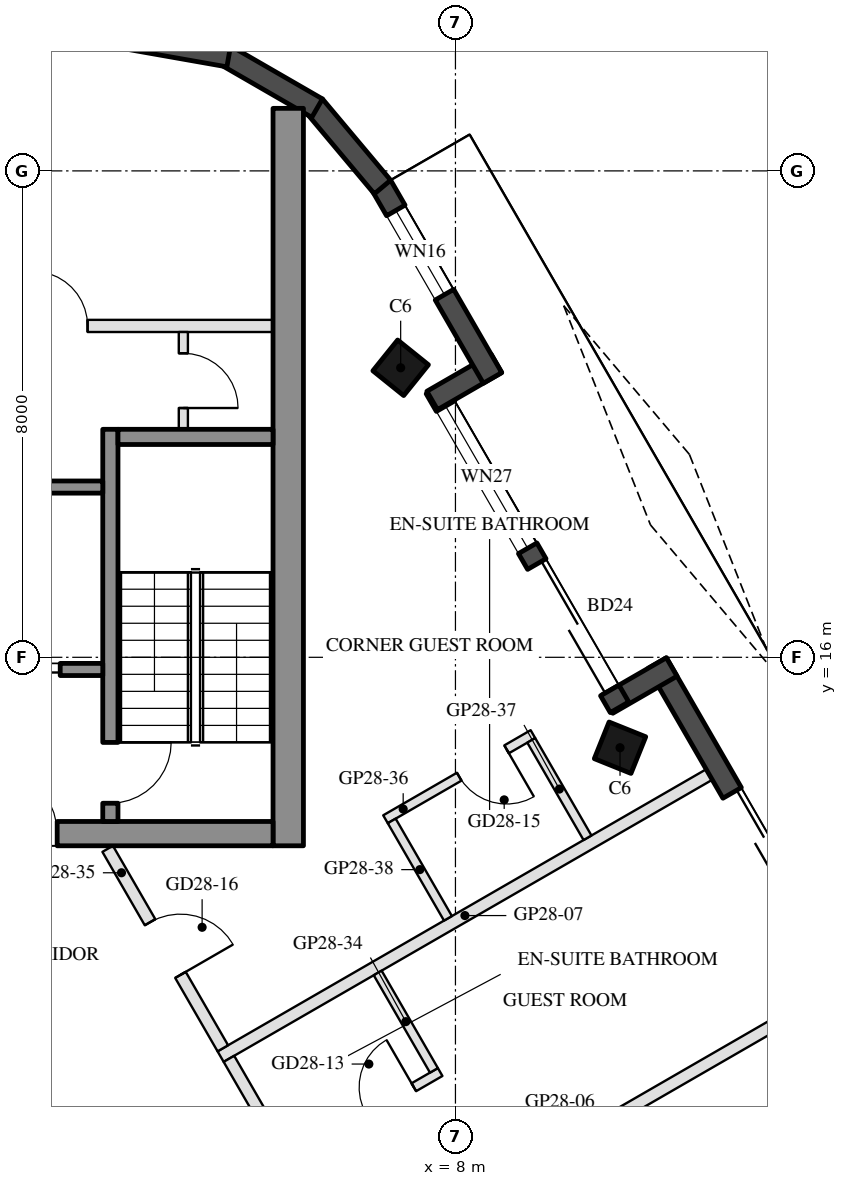
"""IFC4 building model, lengths in metres.
Left out: names, types, materials, properties, quantities, classifications, styles, units other than length and angle.
Written with IfcOpenShell. Run it as: python <this file> out.ifc"""

import sys

from ifc_helpers import new_model, si_unit, direction, frame, frame_2d, origin, origin_2d, place, context, subcontext, project, spatial, rectangle, hollow_rectangle, extrude, boolean, halfspace, element, fill, save


model = new_model("IFC4")
c1 = context("Model", 3, precision=1e-05, world=origin(), true_north=direction((0.0, 1.0)))
c2 = subcontext(c1, "Body", "Model", "MODEL_VIEW")
j1 = project(units=[si_unit("LENGTHUNIT", "METRE"), si_unit("PLANEANGLEUNIT", "RADIAN")], contexts=[c1])
p1 = place(None, origin())
s1 = spatial("IfcSite", under=j1, at=p1, CompositionType="ELEMENT")
p2 = place(p1, origin())
s2 = spatial("IfcBuilding", under=s1, at=p2, CompositionType="ELEMENT")
p3 = place(p2, frame((0.0, 0.0, 287.4)))
s3 = spatial("IfcBuildingStorey", under=s2, at=p3, CompositionType="ELEMENT", Elevation=287.4)
p4 = place(p3, frame((10.707, 14.513, 0.0), z_axis=(-0.100511564979, -0.128308480942, 0.986627771261), x_axis=(-0.503128985572, 0.862066140583, 0.060853867073)))
e1 = element("IfcColumn", 1, at=p4, inside=s3, PredefinedType="COLUMN", context=c2, shape_type="SweptSolid", body=[
    boolean("DIFFERENCE", boolean("DIFFERENCE", extrude(hollow_rectangle(XDim=0.65, YDim=0.65, WallThickness=0.03, at=origin_2d()), origin(), (0.0, 0.0, 1.0), 3.75), halfspace(frame((0.0, 0.0, 0.04), z_axis=(0.0, 0.0, 1.0), x_axis=(1.0, 0.0, 0.0)), True)), halfspace(frame((0.0, 0.0, 3.711), z_axis=(0.0, 0.0, 1.0), x_axis=(1.0, 0.0, 0.0)), False)),
])
p5 = place(p3, frame((7.099, 20.762, 0.0), z_axis=(-0.069724781061, -0.17997668649, 0.981196640448), x_axis=(-0.504170276758, 0.855083108193, 0.121017395929)))
e2 = element("IfcColumn", 2, at=p5, inside=s3, PredefinedType="COLUMN", context=c2, shape_type="SweptSolid", body=[
    boolean("DIFFERENCE", boolean("DIFFERENCE", extrude(hollow_rectangle(XDim=0.65, YDim=0.65, WallThickness=0.03, at=origin_2d()), origin(), (0.0, 0.0, 1.0), 3.771), halfspace(frame((0.0, 0.0, 0.047), z_axis=(0.0, 0.0, 1.0), x_axis=(1.0, 0.0, 0.0)), True)), halfspace(frame((0.0, 0.0, 3.724), z_axis=(0.0, 0.0, 1.0), x_axis=(1.0, 0.0, 0.0)), False)),
])
p6 = place(p3, frame((15.825, 8.097, 0.0), z_axis=(0.0, 0.0, 1.0), x_axis=(-0.500006872736, 0.866021435772, 0.0)))
e3 = element("IfcWall", 3, at=p6, inside=s3, PredefinedType="SOLIDWALL", context=c2, shape_type="SweptSolid", body=[
    extrude(rectangle(XDim=9.015, YDim=0.35, at=frame_2d((4.508, 0.0))), origin(), (0.0, 0.0, 1.0), 3.55),
])
p7 = place(p6, frame((1.579, 0.0, 0.3)))
e4 = element("IfcOpeningElement", 4, at=p7, cuts=e3, PredefinedType="OPENING", context=c2, shape_type="SweptSolid", body=[
    extrude(rectangle(XDim=0.8, YDim=2.65, at=frame_2d((0.4, 1.325))), frame((0.0, 0.185, 0.0), z_axis=(0.0, -1.0, 0.0), x_axis=(1.0, 0.0, 0.0)), (0.0, 0.0, 1.0), 0.37),
])
p8 = place(p6, frame((4.75, 0.0, 0.0)))
e5 = element("IfcOpeningElement", 5, at=p8, cuts=e3, PredefinedType="OPENING", context=c2, shape_type="SweptSolid", body=[
    extrude(rectangle(XDim=1.8, YDim=2.4, at=frame_2d((0.9, 1.2))), frame((0.0, 0.185, 0.0), z_axis=(0.0, -1.0, 0.0), x_axis=(1.0, 0.0, 0.0)), (0.0, 0.0, 1.0), 0.37),
])
p9 = place(p6, frame((3.35, 0.0, 0.3)))
e6 = element("IfcOpeningElement", 6, at=p9, cuts=e3, PredefinedType="OPENING", context=c2, shape_type="SweptSolid", body=[
    extrude(rectangle(XDim=1.0, YDim=2.65, at=frame_2d((0.5, 1.325))), frame((0.0, 0.185, 0.0), z_axis=(0.0, -1.0, 0.0), x_axis=(1.0, 0.0, 0.0)), (0.0, 0.0, 1.0), 0.37),
])
p10 = place(p3, frame((11.557, 15.841, 0.0), z_axis=(0.0, 0.0, 1.0), x_axis=(-0.866005645448, -0.500034220881, 0.0)))
e7 = element("IfcWall", 7, at=p10, inside=s3, PredefinedType="SOLIDWALL", context=c2, shape_type="SweptSolid", body=[
    extrude(rectangle(XDim=1.22, YDim=0.35, at=frame_2d((0.61, 0.0))), origin(), (0.0, 0.0, 1.0), 3.55),
])
p11 = place(p3, frame((10.698, 15.178, 0.0), z_axis=(0.0, 0.0, 1.0), x_axis=(-0.499985371027, 0.866033849661, 0.0)))
e8 = element("IfcWall", 8, at=p11, inside=s3, PredefinedType="SOLIDWALL", context=c2, shape_type="SweptSolid", body=[
    extrude(rectangle(XDim=6.055, YDim=0.35, at=frame_2d((3.028, 0.0))), origin(), (0.0, 0.0, 1.0), 3.55),
])
p12 = place(p11, frame((0.32, 0.0, 0.0)))
e9 = element("IfcOpeningElement", 9, at=p12, cuts=e8, PredefinedType="OPENING", context=c2, shape_type="SweptSolid", body=[
    extrude(rectangle(XDim=2.4, YDim=2.4, at=frame_2d((1.2, 1.2))), frame((0.0, 0.185, 0.0), z_axis=(0.0, -1.0, 0.0), x_axis=(1.0, 0.0, 0.0)), (0.0, 0.0, 1.0), 0.37),
])
p13 = place(p11, frame((3.02, 0.0, 0.3)))
e10 = element("IfcOpeningElement", 10, at=p13, cuts=e8, PredefinedType="OPENING", context=c2, shape_type="SweptSolid", body=[
    extrude(rectangle(XDim=2.7, YDim=2.65, at=frame_2d((1.35, 1.325))), frame((0.0, 0.185, 0.0), z_axis=(0.0, -1.0, 0.0), x_axis=(1.0, 0.0, 0.0)), (0.0, 0.0, 1.0), 0.37),
])
p14 = place(p3, frame((7.617, 20.224, 0.0), z_axis=(0.0, 0.0, 1.0), x_axis=(0.866005645448, 0.500034220881, 0.0)))
e11 = element("IfcWall", 11, at=p14, inside=s3, PredefinedType="SOLIDWALL", context=c2, shape_type="SweptSolid", body=[
    extrude(rectangle(XDim=1.22, YDim=0.35, at=frame_2d((0.61, 0.0))), origin(), (0.0, 0.0, 1.0), 3.55),
])
p15 = place(p3, frame((8.61, 20.595, 0.0), z_axis=(0.0, 0.0, 1.0), x_axis=(-0.499990402704, 0.866030944715, 0.0)))
e12 = element("IfcWall", 12, at=p15, inside=s3, PredefinedType="SOLIDWALL", context=c2, shape_type="SweptSolid", body=[
    extrude(rectangle(XDim=3.654, YDim=0.35, at=frame_2d((1.827, 0.0))), origin(), (0.0, 0.0, 1.0), 3.55),
])
p16 = place(p15, frame((1.581, 0.0, 0.3)))
e13 = element("IfcOpeningElement", 13, at=p16, cuts=e12, PredefinedType="OPENING", context=c2, shape_type="SweptSolid", body=[
    extrude(rectangle(XDim=1.6, YDim=2.65, at=frame_2d((0.8, 1.325))), frame((0.0, 0.185, 0.0), z_axis=(0.0, -1.0, 0.0), x_axis=(1.0, 0.0, 0.0)), (0.0, 0.0, 1.0), 0.37),
])
for number, where, z_axis, x_axis in (
    (14, (6.8, 23.735, 0.0), (0.0, 0.0, 1.0), (-0.643, 0.766, 0.0)),
    (15, (5.725, 25.032, 0.0), (0.0, 0.0, 1.0), (-0.866, 0.5, 0.0)),
    (16, (4.271, 25.884, 0.0), (0.0, 0.0, 1.0), (-0.985, 0.174, 0.0)),
):
    element("IfcWall", number, at=place(p3, frame(where, z_axis=z_axis, x_axis=x_axis)), inside=s3, PredefinedType="SOLIDWALL", context=c2, shape_type="SweptSolid", body=[
        extrude(rectangle(XDim=1.745, YDim=0.35, at=frame_2d((0.872, 0.0))), origin(), (0.0, 0.0, 1.0), 3.55),
    ])
p17 = place(p3, frame((5.25, 12.9, 0.0), z_axis=(0.0, 0.0, 1.0), x_axis=(0.0, 1.0, 0.0)))
e17 = element("IfcWall", 17, at=p17, inside=s3, PredefinedType="SHEAR", context=c2, shape_type="SweptSolid", body=[
    extrude(rectangle(XDim=12.129, YDim=0.5, at=frame_2d((6.064, 0.0))), origin(), (0.0, 0.0, 1.0), 3.5),
])
p18 = place(p3, frame((5.0, 13.1, 0.0), z_axis=(0.0, 0.0, 1.0), x_axis=(-1.0, 0.0, 0.0)))
e18 = element("IfcWall", 18, at=p18, inside=s3, PredefinedType="SHEAR", context=c2, shape_type="SweptSolid", body=[
    extrude(rectangle(XDim=10.0, YDim=0.4, at=frame_2d((5.0, 0.0))), origin(), (0.0, 0.0, 1.0), 3.5),
])
p19 = place(p18, frame((3.55, 0.0, 0.0)))
e19 = element("IfcOpeningElement", 19, at=p19, cuts=e18, PredefinedType="OPENING", context=c2, shape_type="SweptSolid", body=[
    extrude(rectangle(XDim=1.1, YDim=2.1, at=frame_2d((0.55, 1.05))), frame((0.0, 0.21, 0.0), z_axis=(0.0, -1.0, 0.0), x_axis=(1.0, 0.0, 0.0)), (0.0, 0.0, 1.0), 0.42),
])
p20 = place(p18, frame((5.85, 0.0, 0.0)))
e20 = element("IfcOpeningElement", 20, at=p20, cuts=e18, PredefinedType="OPENING", context=c2, shape_type="SweptSolid", body=[
    extrude(rectangle(XDim=1.4, YDim=2.1, at=frame_2d((0.7, 1.05))), frame((0.0, 0.21, 0.0), z_axis=(0.0, -1.0, 0.0), x_axis=(1.0, 0.0, 0.0)), (0.0, 0.0, 1.0), 0.42),
])
p21 = place(p3, frame((2.325, 13.3, 0.0), z_axis=(0.0, 0.0, 1.0), x_axis=(0.0, 1.0, 0.0)))
e21 = element("IfcWall", 21, at=p21, inside=s3, PredefinedType="SHEAR", context=c2, shape_type="SweptSolid", body=[
    extrude(rectangle(XDim=6.45, YDim=0.25, at=frame_2d((3.225, 0.0))), origin(), (0.0, 0.0, 1.0), 3.5),
])
p22 = place(p21, frame((0.3, 0.0, 0.0)))
e22 = element("IfcOpeningElement", 22, at=p22, cuts=e21, PredefinedType="OPENING", context=c2, shape_type="SweptSolid", body=[
    extrude(rectangle(XDim=1.0, YDim=2.1, at=frame_2d((0.5, 1.05))), frame((0.0, 0.135, 0.0), z_axis=(0.0, -1.0, 0.0), x_axis=(1.0, 0.0, 0.0)), (0.0, 0.0, 1.0), 0.27),
])
p23 = place(p3, frame((5.0, 19.625, 0.0), z_axis=(0.0, 0.0, 1.0), x_axis=(-1.0, 0.0, 0.0)))
e23 = element("IfcWall", 23, at=p23, inside=s3, PredefinedType="SHEAR", context=c2, shape_type="SweptSolid", body=[
    extrude(rectangle(XDim=2.55, YDim=0.25, at=frame_2d((1.275, 0.0))), origin(), (0.0, 0.0, 1.0), 3.5),
])
p24 = place(p3, frame((2.2, 18.8, 0.0), z_axis=(0.0, 0.0, 1.0), x_axis=(-1.0, 0.0, 0.0)))
e24 = element("IfcWall", 24, at=p24, inside=s3, PredefinedType="SHEAR", context=c2, shape_type="SweptSolid", body=[
    extrude(rectangle(XDim=2.8, YDim=0.2, at=frame_2d((1.4, 0.0))), origin(), (0.0, 0.0, 1.0), 3.5),
])
p25 = place(p3, frame((2.2, 15.8, 0.0), z_axis=(0.0, 0.0, 1.0), x_axis=(-1.0, 0.0, 0.0)))
e25 = element("IfcWall", 25, at=p25, inside=s3, PredefinedType="SHEAR", context=c2, shape_type="SweptSolid", body=[
    extrude(rectangle(XDim=2.8, YDim=0.2, at=frame_2d((1.4, 0.0))), origin(), (0.0, 0.0, 1.0), 3.5),
])
p26 = place(p25, frame((0.7, 0.0, 0.0)))
e26 = element("IfcOpeningElement", 26, at=p26, cuts=e25, PredefinedType="OPENING", context=c2, shape_type="SweptSolid", body=[
    extrude(rectangle(XDim=1.2, YDim=2.1, at=frame_2d((0.6, 1.05))), frame((0.0, 0.11, 0.0), z_axis=(0.0, -1.0, 0.0), x_axis=(1.0, 0.0, 0.0)), (0.0, 0.0, 1.0), 0.22),
])
p27 = place(p3, frame((5.0, 21.45, 0.0), z_axis=(0.0, 0.0, 1.0), x_axis=(-1.0, 0.0, 0.0)))
e27 = element("IfcWall", 27, at=p27, inside=s3, PredefinedType="PARTITIONING", context=c2, shape_type="SweptSolid", body=[
    extrude(rectangle(XDim=5.4, YDim=0.2, at=frame_2d((2.7, 0.0))), origin(), (0.0, 0.0, 1.0), 3.5),
])
p28 = place(p27, frame((3.05, 0.0, 0.0)))
e28 = element("IfcOpeningElement", 28, at=p28, cuts=e27, PredefinedType="OPENING", context=c2, shape_type="SweptSolid", body=[
    extrude(rectangle(XDim=0.9, YDim=2.1, at=frame_2d((0.45, 1.05))), frame((0.0, 0.11, 0.0), z_axis=(0.0, -1.0, 0.0), x_axis=(1.0, 0.0, 0.0)), (0.0, 0.0, 1.0), 0.22),
])
p29 = place(p3, frame((3.525, 19.75, 0.0), z_axis=(0.0, 0.0, 1.0), x_axis=(0.0, 1.0, 0.0)))
e29 = element("IfcWall", 29, at=p29, inside=s3, PredefinedType="PARTITIONING", context=c2, shape_type="SweptSolid", body=[
    extrude(rectangle(XDim=1.6, YDim=0.15, at=frame_2d((0.8, 0.0))), origin(), (0.0, 0.0, 1.0), 3.5),
])
p30 = place(p29, frame((0.35, 0.0, 0.0)))
e30 = element("IfcOpeningElement", 30, at=p30, cuts=e29, PredefinedType="OPENING", context=c2, shape_type="SweptSolid", body=[
    extrude(rectangle(XDim=0.9, YDim=2.1, at=frame_2d((0.45, 1.05))), frame((0.0, 0.085, 0.0), z_axis=(0.0, -1.0, 0.0), x_axis=(1.0, 0.0, 0.0)), (0.0, 0.0, 1.0), 0.17),
])
p31 = place(p3, frame((14.224, 10.521, 0.0), z_axis=(0.0, 0.0, 1.0), x_axis=(-0.866024341471, -0.500001839976, 0.0)))
e31 = element("IfcWall", 31, at=p31, inside=s3, PredefinedType="PARTITIONING", context=c2, shape_type="SweptSolid", body=[
    extrude(rectangle(XDim=9.279, YDim=0.2, at=frame_2d((4.639, 0.0))), origin(), (0.0, 0.0, 1.0), 3.1),
])
p32 = place(p3, frame((12.174, 14.072, 0.0), z_axis=(0.0, 0.0, 1.0), x_axis=(-0.866035734738, -0.499982105836, 0.0)))
e32 = element("IfcWall", 32, at=p32, inside=s3, PredefinedType="PARTITIONING", context=c2, shape_type="SweptSolid", body=[
    extrude(rectangle(XDim=9.279, YDim=0.2, at=frame_2d((4.639, 0.0))), origin(), (0.0, 0.0, 1.0), 3.1),
])
p33 = place(p3, frame((4.275, 9.396, 0.0), z_axis=(0.0, 0.0, 1.0), x_axis=(0.499997012787, -0.866027128446, 0.0)))
e33 = element("IfcWall", 33, at=p33, inside=s3, PredefinedType="PARTITIONING", context=c2, shape_type="SweptSolid", body=[
    extrude(rectangle(XDim=3.9, YDim=0.2, at=frame_2d((1.95, 0.0))), origin(), (0.0, 0.0, 1.0), 3.05),
])
p34 = place(p33, frame((2.45, 0.0, 0.0)))
e34 = element("IfcOpeningElement", 34, at=p34, cuts=e33, PredefinedType="OPENING", context=c2, shape_type="SweptSolid", body=[
    extrude(rectangle(XDim=1.0, YDim=2.1, at=frame_2d((0.5, 1.05))), frame((0.0, 0.11, 0.0), z_axis=(0.0, -1.0, 0.0), x_axis=(1.0, 0.0, 0.0)), (0.0, 0.0, 1.0), 0.22),
])
p35 = place(p3, frame((5.324, 7.779, 0.0), z_axis=(0.0, 0.0, 1.0), x_axis=(0.865996816683, 0.500049511043, 0.0)))
e35 = element("IfcWall", 35, at=p35, inside=s3, PredefinedType="PARTITIONING", context=c2, shape_type="SweptSolid", body=[
    extrude(rectangle(XDim=2.8, YDim=0.15, at=frame_2d((1.4, 0.0))), origin(), (0.0, 0.0, 1.0), 3.55),
])
p36 = place(p35, frame((1.4, 0.0, 0.0)))
e36 = element("IfcOpeningElement", 36, at=p36, cuts=e35, PredefinedType="OPENING", context=c2, shape_type="SweptSolid", body=[
    extrude(rectangle(XDim=0.9, YDim=2.1, at=frame_2d((0.45, 1.05))), frame((0.0, 0.085, 0.0), z_axis=(0.0, -1.0, 0.0), x_axis=(1.0, 0.0, 0.0)), (0.0, 0.0, 1.0), 0.17),
])
p37 = place(p3, frame((7.646, 9.207, 0.0), z_axis=(0.0, 0.0, 1.0), x_axis=(-0.49994333299, 0.866058118026, 0.0)))
e37 = element("IfcWall", 37, at=p37, inside=s3, PredefinedType="PARTITIONING", context=c2, shape_type="SweptSolid", body=[
    extrude(rectangle(XDim=1.85, YDim=0.15, at=frame_2d((0.925, 0.0))), origin(), (0.0, 0.0, 1.0), 3.55),
])
p38 = place(p3, frame((2.281, 12.85, 0.0), z_axis=(0.0, 0.0, 1.0), x_axis=(0.499979074716, -0.866037484666, 0.0)))
e38 = element("IfcWall", 38, at=p38, inside=s3, PredefinedType="PARTITIONING", context=c2, shape_type="SweptSolid", body=[
    extrude(rectangle(XDim=3.788, YDim=0.2, at=frame_2d((1.894, 0.0))), origin(), (0.0, 0.0, 1.0), 3.05),
])
p39 = place(p38, frame((1.394, 0.0, 0.0)))
e39 = element("IfcOpeningElement", 39, at=p39, cuts=e38, PredefinedType="OPENING", context=c2, shape_type="SweptSolid", body=[
    extrude(rectangle(XDim=1.0, YDim=2.1, at=frame_2d((0.5, 1.05))), frame((0.0, 0.11, 0.0), z_axis=(0.0, -1.0, 0.0), x_axis=(1.0, 0.0, 0.0)), (0.0, 0.0, 1.0), 0.22),
])
p40 = place(p3, frame((9.274, 14.737, 0.0), z_axis=(0.0, 0.0, 1.0), x_axis=(-0.866018616679, -0.500011755427, 0.0)))
e40 = element("IfcWall", 40, at=p40, inside=s3, PredefinedType="PARTITIONING", context=c2, shape_type="SweptSolid", body=[
    extrude(rectangle(XDim=2.8, YDim=0.15, at=frame_2d((1.4, 0.0))), origin(), (0.0, 0.0, 1.0), 3.1),
])
p41 = place(p40, frame((0.5, 0.0, 0.0)))
e41 = element("IfcOpeningElement", 41, at=p41, cuts=e40, PredefinedType="OPENING", context=c2, shape_type="SweptSolid", body=[
    extrude(rectangle(XDim=0.9, YDim=2.1, at=frame_2d((0.45, 1.05))), frame((0.0, 0.085, 0.0), z_axis=(0.0, -1.0, 0.0), x_axis=(1.0, 0.0, 0.0)), (0.0, 0.0, 1.0), 0.17),
])
p42 = place(p3, frame((10.172, 13.032, 0.0), z_axis=(0.0, 0.0, 1.0), x_axis=(-0.500042316284, 0.866000971088, 0.0)))
e42 = element("IfcWall", 42, at=p42, inside=s3, PredefinedType="PARTITIONING", context=c2, shape_type="SweptSolid", body=[
    extrude(rectangle(XDim=1.85, YDim=0.15, at=frame_2d((0.925, 0.0))), origin(), (0.0, 0.0, 1.0), 3.05),
])
p43 = place(p3, frame((7.877, 11.707, 0.0), z_axis=(0.0, 0.0, 1.0), x_axis=(-0.499985172903, 0.866033964044, 0.0)))
e43 = element("IfcWall", 43, at=p43, inside=s3, PredefinedType="PARTITIONING", context=c2, shape_type="SweptSolid", body=[
    extrude(rectangle(XDim=1.85, YDim=0.15, at=frame_2d((0.925, 0.0))), origin(), (0.0, 0.0, 1.0), 3.05),
])
p44 = place(p8, frame((1.8, 0.0, 0.0), z_axis=(0.0, 0.0, 1.0), x_axis=(-1.0, 0.0, 0.0)))
e44 = element("IfcDoor", 44, at=p44, inside=s3, OperationType="SLIDING_TO_LEFT", PredefinedType="DOOR", context=c2, shape_type="SweptSolid", body=[
    extrude(rectangle(XDim=1.8, YDim=2.4, at=frame_2d((0.9, 1.2))), frame((0.0, 0.025, 0.0), z_axis=(0.0, -1.0, 0.0), x_axis=(1.0, 0.0, 0.0)), (0.0, 0.0, 1.0), 0.05),
])
fill(e5, e44)
p45 = place(p12, frame((2.4, 0.0, 0.0), z_axis=(0.0, 0.0, 1.0), x_axis=(-1.0, 0.0, 0.0)))
e45 = element("IfcDoor", 45, at=p45, inside=s3, OperationType="SLIDING_TO_LEFT", PredefinedType="DOOR", context=c2, shape_type="SweptSolid", body=[
    extrude(rectangle(XDim=2.4, YDim=2.4, at=frame_2d((1.2, 1.2))), frame((0.0, 0.025, 0.0), z_axis=(0.0, -1.0, 0.0), x_axis=(1.0, 0.0, 0.0)), (0.0, 0.0, 1.0), 0.05),
])
fill(e9, e45)
p46 = place(p13, origin())
e46 = element("IfcWindow", 46, at=p46, inside=s3, PartitioningType="SINGLE_PANEL", PredefinedType="WINDOW", context=c2, shape_type="SweptSolid", body=[
    extrude(rectangle(XDim=2.7, YDim=2.65, at=frame_2d((1.35, 1.325))), frame((0.0, 0.03, 0.0), z_axis=(0.0, -1.0, 0.0), x_axis=(1.0, 0.0, 0.0)), (0.0, 0.0, 1.0), 0.06),
])
fill(e10, e46)
p47 = place(p16, origin())
e47 = element("IfcWindow", 47, at=p47, inside=s3, PartitioningType="SINGLE_PANEL", PredefinedType="WINDOW", context=c2, shape_type="SweptSolid", body=[
    extrude(rectangle(XDim=1.6, YDim=2.65, at=frame_2d((0.8, 1.325))), frame((0.0, 0.03, 0.0), z_axis=(0.0, -1.0, 0.0), x_axis=(1.0, 0.0, 0.0)), (0.0, 0.0, 1.0), 0.06),
])
fill(e13, e47)
p48 = place(p26, origin())
e48 = element("IfcDoor", 48, at=p48, inside=s3, OperationType="DOUBLE_DOOR_SLIDING", PredefinedType="DOOR", context=c2, shape_type="SweptSolid", body=[
    extrude(rectangle(XDim=1.2, YDim=2.1, at=frame_2d((0.6, 1.05))), frame((0.0, 0.025, 0.0), z_axis=(0.0, -1.0, 0.0), x_axis=(1.0, 0.0, 0.0)), (0.0, 0.0, 1.0), 0.05),
])
fill(e26, e48)
p49 = place(p30, frame((0.9, 0.0, 0.0), z_axis=(0.0, 0.0, 1.0), x_axis=(-1.0, 0.0, 0.0)))
e49 = element("IfcDoor", 49, at=p49, inside=s3, OperationType="SINGLE_SWING_RIGHT", PredefinedType="DOOR", context=c2, shape_type="SweptSolid", body=[
    extrude(rectangle(XDim=0.9, YDim=2.1, at=frame_2d((0.45, 1.05))), frame((0.0, 0.025, 0.0), z_axis=(0.0, -1.0, 0.0), x_axis=(1.0, 0.0, 0.0)), (0.0, 0.0, 1.0), 0.05),
])
fill(e30, e49)
p50 = place(p28, frame((0.9, 0.0, 0.0), z_axis=(0.0, 0.0, 1.0), x_axis=(-1.0, 0.0, 0.0)))
e50 = element("IfcDoor", 50, at=p50, inside=s3, OperationType="SINGLE_SWING_LEFT", PredefinedType="DOOR", context=c2, shape_type="SweptSolid", body=[
    extrude(rectangle(XDim=0.9, YDim=2.1, at=frame_2d((0.45, 1.05))), frame((0.0, 0.025, 0.0), z_axis=(0.0, -1.0, 0.0), x_axis=(1.0, 0.0, 0.0)), (0.0, 0.0, 1.0), 0.05),
])
fill(e28, e50)
p51 = place(p19, frame((1.1, 0.0, 0.0), z_axis=(0.0, 0.0, 1.0), x_axis=(-1.0, 0.0, 0.0)))
e51 = element("IfcDoor", 51, at=p51, inside=s3, OperationType="SINGLE_SWING_LEFT", PredefinedType="DOOR", context=c2, shape_type="SweptSolid", body=[
    extrude(rectangle(XDim=1.1, YDim=2.1, at=frame_2d((0.55, 1.05))), frame((0.0, 0.025, 0.0), z_axis=(0.0, -1.0, 0.0), x_axis=(1.0, 0.0, 0.0)), (0.0, 0.0, 1.0), 0.05),
])
fill(e19, e51)
p52 = place(p22, frame((1.0, 0.0, 0.0), z_axis=(0.0, 0.0, 1.0), x_axis=(-1.0, 0.0, 0.0)))
e52 = element("IfcDoor", 52, at=p52, inside=s3, OperationType="SINGLE_SWING_LEFT", PredefinedType="DOOR", context=c2, shape_type="SweptSolid", body=[
    extrude(rectangle(XDim=1.0, YDim=2.1, at=frame_2d((0.5, 1.05))), frame((0.0, 0.025, 0.0), z_axis=(0.0, -1.0, 0.0), x_axis=(1.0, 0.0, 0.0)), (0.0, 0.0, 1.0), 0.05),
])
fill(e22, e52)
p53 = place(p36, origin())
e53 = element("IfcDoor", 53, at=p53, inside=s3, OperationType="SINGLE_SWING_RIGHT", PredefinedType="DOOR", context=c2, shape_type="SweptSolid", body=[
    extrude(rectangle(XDim=0.9, YDim=2.1, at=frame_2d((0.45, 1.05))), frame((0.0, 0.025, 0.0), z_axis=(0.0, -1.0, 0.0), x_axis=(1.0, 0.0, 0.0)), (0.0, 0.0, 1.0), 0.05),
])
fill(e36, e53)
p54 = place(p41, origin())
e54 = element("IfcDoor", 54, at=p54, inside=s3, OperationType="SINGLE_SWING_LEFT", PredefinedType="DOOR", context=c2, shape_type="SweptSolid", body=[
    extrude(rectangle(XDim=0.9, YDim=2.1, at=frame_2d((0.45, 1.05))), frame((0.0, 0.025, 0.0), z_axis=(0.0, -1.0, 0.0), x_axis=(1.0, 0.0, 0.0)), (0.0, 0.0, 1.0), 0.05),
])
fill(e41, e54)
p55 = place(p39, origin())
e55 = element("IfcDoor", 55, at=p55, inside=s3, OperationType="SINGLE_SWING_RIGHT", PredefinedType="DOOR", context=c2, shape_type="SweptSolid", body=[
    extrude(rectangle(XDim=1.0, YDim=2.1, at=frame_2d((0.5, 1.05))), frame((0.0, 0.025, 0.0), z_axis=(0.0, -1.0, 0.0), x_axis=(1.0, 0.0, 0.0)), (0.0, 0.0, 1.0), 0.05),
])
fill(e39, e55)
save(model, sys.argv[1])
